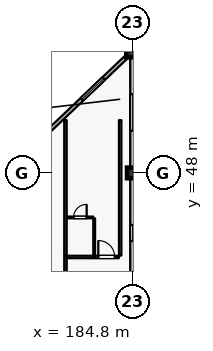
"""IFC4 building model, lengths in metres.
Left out: names, types, materials, properties, quantities, classifications, styles, units other than length and angle.
Written with IfcOpenShell. Run it as: python <this file> out.ifc"""

import sys

from ifc_helpers import new_model, si_unit, direction, frame, frame_2d, origin, origin_2d, place, context, subcontext, project, spatial, rectangle, extrude, element, fill, save


model = new_model("IFC4")
c1 = context("Model", 3, precision=1e-05, world=origin(), true_north=direction((0.0, 1.0)))
c2 = subcontext(c1, "Body", "Model", "MODEL_VIEW")
j1 = project(units=[si_unit("LENGTHUNIT", "METRE"), si_unit("PLANEANGLEUNIT", "RADIAN")], contexts=[c1])
p1 = place(None, origin())
s1 = spatial("IfcSite", under=j1, at=p1, CompositionType="ELEMENT")
p2 = place(p1, origin())
s2 = spatial("IfcBuilding", under=s1, at=p2, CompositionType="ELEMENT")
p3 = place(p2, frame((0.0, 0.0, 21.0)))
s3 = spatial("IfcBuildingStorey", under=s2, at=p3, CompositionType="ELEMENT", Elevation=21.0)
p4 = place(p3, frame((184.8, 56.0, 0.0), z_axis=(0.0, 0.0, 1.0), x_axis=(1.0, 0.0, 0.0)))
e1 = element("IfcColumn", 1, at=p4, inside=s3, PredefinedType="COLUMN", context=c2, shape_type="SweptSolid", body=[
    extrude(rectangle(XDim=0.8, YDim=0.8, at=origin_2d()), origin(), (0.0, 0.0, 1.0), 4.2),
])
p5 = place(p3, frame((184.8, 48.0, 0.0), z_axis=(0.0, 0.0, 1.0), x_axis=(1.0, 0.0, 0.0)))
e2 = element("IfcColumn", 2, at=p5, inside=s3, PredefinedType="COLUMN", context=c2, shape_type="SweptSolid", body=[
    extrude(rectangle(XDim=0.7, YDim=0.7, at=origin_2d()), origin(), (0.0, 0.0, 1.0), 4.2),
])
p6 = place(p3, frame((176.8, 48.381, 0.0), z_axis=(0.0, 0.0, 1.0), x_axis=(0.724145676014, 0.689647040094, 0.0)))
e3 = element("IfcWall", 3, at=p6, inside=s3, PredefinedType="SOLIDWALL", context=c2, shape_type="SweptSolid", body=[
    extrude(rectangle(XDim=10.495, YDim=0.24, at=frame_2d((5.248, 0.0))), origin(), (0.0, 0.0, 1.0), 3.53),
])
p7 = place(p6, frame((1.486, 0.0, 0.8)))
e4 = element("IfcOpeningElement", 4, at=p7, cuts=e3, PredefinedType="OPENING", context=c2, shape_type="SweptSolid", body=[
    extrude(rectangle(XDim=2.0, YDim=1.75, at=frame_2d((1.0, 0.875))), frame((0.0, 0.13, 0.0), z_axis=(0.0, -1.0, 0.0), x_axis=(1.0, 0.0, 0.0)), (0.0, 0.0, 1.0), 0.26),
])
p8 = place(p6, frame((6.457, 0.0, 0.8)))
e5 = element("IfcOpeningElement", 5, at=p8, cuts=e3, PredefinedType="OPENING", context=c2, shape_type="SweptSolid", body=[
    extrude(rectangle(XDim=2.0, YDim=1.75, at=frame_2d((1.0, 0.875))), frame((0.0, 0.13, 0.0), z_axis=(0.0, -1.0, 0.0), x_axis=(1.0, 0.0, 0.0)), (0.0, 0.0, 1.0), 0.26),
])
p9 = place(p3, frame((184.8, 55.6, 0.0), z_axis=(0.0, 0.0, 1.0), x_axis=(0.0, -1.0, 0.0)))
e6 = element("IfcWall", 6, at=p9, inside=s3, PredefinedType="SOLIDWALL", context=c2, shape_type="SweptSolid", body=[
    extrude(rectangle(XDim=7.25, YDim=0.28, at=frame_2d((3.625, 0.0))), origin(), (0.0, 0.0, 1.0), 3.3),
])
p10 = place(p9, frame((2.425, 0.0, 0.75)))
e7 = element("IfcOpeningElement", 7, at=p10, cuts=e6, PredefinedType="OPENING", context=c2, shape_type="SweptSolid", body=[
    extrude(rectangle(XDim=2.4, YDim=1.65, at=frame_2d((1.2, 0.825))), frame((0.0, 0.15, 0.0), z_axis=(0.0, -1.0, 0.0), x_axis=(1.0, 0.0, 0.0)), (0.0, 0.0, 1.0), 0.3),
])
p11 = place(p3, frame((184.8, 47.65, 0.0), z_axis=(0.0, 0.0, 1.0), x_axis=(0.0, -1.0, 0.0)))
e8 = element("IfcWall", 8, at=p11, inside=s3, PredefinedType="SOLIDWALL", context=c2, shape_type="SweptSolid", body=[
    extrude(rectangle(XDim=7.2, YDim=0.28, at=frame_2d((3.6, 0.0))), origin(), (0.0, 0.0, 1.0), 3.3),
])
p12 = place(p11, frame((3.075, 0.0, 0.75)))
e9 = element("IfcOpeningElement", 9, at=p12, cuts=e8, PredefinedType="OPENING", context=c2, shape_type="SweptSolid", body=[
    extrude(rectangle(XDim=1.05, YDim=1.65, at=frame_2d((0.525, 0.825))), frame((0.0, 0.15, 0.0), z_axis=(0.0, -1.0, 0.0), x_axis=(1.0, 0.0, 0.0)), (0.0, 0.0, 1.0), 0.3),
])
p13 = place(p3, frame((180.4, 39.13, 0.0), z_axis=(0.0, 0.0, 1.0), x_axis=(0.0, 1.0, 0.0)))
e10 = element("IfcWall", 10, at=p13, inside=s3, PredefinedType="PARTITIONING", context=c2, shape_type="SweptSolid", body=[
    extrude(rectangle(XDim=3.42, YDim=0.16, at=frame_2d((1.71, 0.0))), origin(), (0.0, 0.0, 1.0), 3.965),
])
p14 = place(p3, frame((180.49, 42.47, 0.0), z_axis=(0.0, 0.0, 1.0), x_axis=(1.0, 0.0, 0.0)))
e11 = element("IfcWall", 11, at=p14, inside=s3, PredefinedType="PARTITIONING", context=c2, shape_type="SweptSolid", body=[
    extrude(rectangle(XDim=1.79, YDim=0.16, at=frame_2d((0.895, 0.0))), origin(), (0.0, 0.0, 1.0), 3.965),
])
p15 = place(p3, frame((182.29, 42.47, 0.0), z_axis=(0.0, 0.0, 1.0), x_axis=(1.0, 0.0, 0.0)))
e12 = element("IfcWall", 12, at=p15, inside=s3, PredefinedType="PARTITIONING", context=c2, shape_type="SweptSolid", body=[
    extrude(rectangle(XDim=1.62, YDim=0.16, at=frame_2d((0.81, 0.0))), origin(), (0.0, 0.0, 1.0), 3.965),
])
p16 = place(p15, frame((0.27, 0.0, 0.0)))
e13 = element("IfcOpeningElement", 13, at=p16, cuts=e12, PredefinedType="OPENING", context=c2, shape_type="SweptSolid", body=[
    extrude(rectangle(XDim=1.08, YDim=2.3, at=frame_2d((0.54, 1.15))), frame((0.0, 0.09, 0.0), z_axis=(0.0, -1.0, 0.0), x_axis=(1.0, 0.0, 0.0)), (0.0, 0.0, 1.0), 0.18),
])
p17 = place(p3, frame((182.29, 42.56, 0.0), z_axis=(0.0, 0.0, 1.0), x_axis=(0.0, 1.0, 0.0)))
e14 = element("IfcWall", 14, at=p17, inside=s3, PredefinedType="PARTITIONING", context=c2, shape_type="SweptSolid", body=[
    extrude(rectangle(XDim=2.45, YDim=0.115, at=frame_2d((1.225, 0.0))), origin(), (0.0, 0.0, 1.0), 3.965),
])
p18 = place(p3, frame((180.5, 45.07, 0.0), z_axis=(0.0, 0.0, 1.0), x_axis=(1.0, 0.0, 0.0)))
e15 = element("IfcWall", 15, at=p18, inside=s3, PredefinedType="PARTITIONING", context=c2, shape_type="SweptSolid", body=[
    extrude(rectangle(XDim=1.73, YDim=0.115, at=frame_2d((0.865, 0.0))), origin(), (0.0, 0.0, 1.0), 3.965),
])
p19 = place(p18, frame((0.435, 0.0, 0.0)))
e16 = element("IfcOpeningElement", 16, at=p19, cuts=e15, PredefinedType="OPENING", context=c2, shape_type="SweptSolid", body=[
    extrude(rectangle(XDim=0.86, YDim=2.12, at=frame_2d((0.43, 1.06))), frame((0.0, 0.067, 0.0), z_axis=(0.0, -1.0, 0.0), x_axis=(1.0, 0.0, 0.0)), (0.0, 0.0, 1.0), 0.135),
])
for number, where, z_axis, x_axis in (
    (17, (180.4, 42.56, 0.0), (0.0, 0.0, 1.0), (0.0, 1.0, 0.0)),
    (18, (184.0, 42.56, 0.0), (0.0, 0.0, 1.0), (0.0, 1.0, 0.0)),
):
    element("IfcWall", number, at=place(p3, frame(where, z_axis=z_axis, x_axis=x_axis)), inside=s3, PredefinedType="PARTITIONING", context=c2, shape_type="SweptSolid", body=[
        extrude(rectangle(XDim=8.91, YDim=0.16, at=frame_2d((4.455, 0.0))), origin(), (0.0, 0.0, 1.0), 3.965),
    ])
p20 = place(p8, origin())
e19 = element("IfcWindow", 19, at=p20, inside=s3, PartitioningType="DOUBLE_PANEL_VERTICAL", PredefinedType="WINDOW", context=c2, shape_type="SweptSolid", body=[
    extrude(rectangle(XDim=2.0, YDim=1.75, at=frame_2d((1.0, 0.875))), frame((0.0, 0.03, 0.0), z_axis=(0.0, -1.0, 0.0), x_axis=(1.0, 0.0, 0.0)), (0.0, 0.0, 1.0), 0.06),
])
fill(e5, e19)
p21 = place(p10, origin())
e20 = element("IfcWindow", 20, at=p21, inside=s3, PartitioningType="DOUBLE_PANEL_VERTICAL", PredefinedType="WINDOW", context=c2, shape_type="SweptSolid", body=[
    extrude(rectangle(XDim=2.4, YDim=1.65, at=frame_2d((1.2, 0.825))), frame((0.0, 0.03, 0.0), z_axis=(0.0, -1.0, 0.0), x_axis=(1.0, 0.0, 0.0)), (0.0, 0.0, 1.0), 0.06),
])
fill(e7, e20)
p22 = place(p12, origin())
e21 = element("IfcWindow", 21, at=p22, inside=s3, PartitioningType="SINGLE_PANEL", PredefinedType="WINDOW", context=c2, shape_type="SweptSolid", body=[
    extrude(rectangle(XDim=1.05, YDim=1.65, at=frame_2d((0.525, 0.825))), frame((0.0, 0.03, 0.0), z_axis=(0.0, -1.0, 0.0), x_axis=(1.0, 0.0, 0.0)), (0.0, 0.0, 1.0), 0.06),
])
fill(e9, e21)
p23 = place(p16, origin())
e22 = element("IfcDoor", 22, at=p23, inside=s3, OperationType="SINGLE_SWING_LEFT", PredefinedType="DOOR", context=c2, shape_type="SweptSolid", body=[
    extrude(rectangle(XDim=1.08, YDim=2.3, at=frame_2d((0.54, 1.15))), frame((0.0, 0.025, 0.0), z_axis=(0.0, -1.0, 0.0), x_axis=(1.0, 0.0, 0.0)), (0.0, 0.0, 1.0), 0.05),
])
fill(e13, e22)
p24 = place(p19, origin())
e23 = element("IfcDoor", 23, at=p24, inside=s3, OperationType="SINGLE_SWING_RIGHT", PredefinedType="DOOR", context=c2, shape_type="SweptSolid", body=[
    extrude(rectangle(XDim=0.86, YDim=2.12, at=frame_2d((0.43, 1.06))), frame((0.0, 0.025, 0.0), z_axis=(0.0, -1.0, 0.0), x_axis=(1.0, 0.0, 0.0)), (0.0, 0.0, 1.0), 0.05),
])
fill(e16, e23)
save(model, sys.argv[1])
